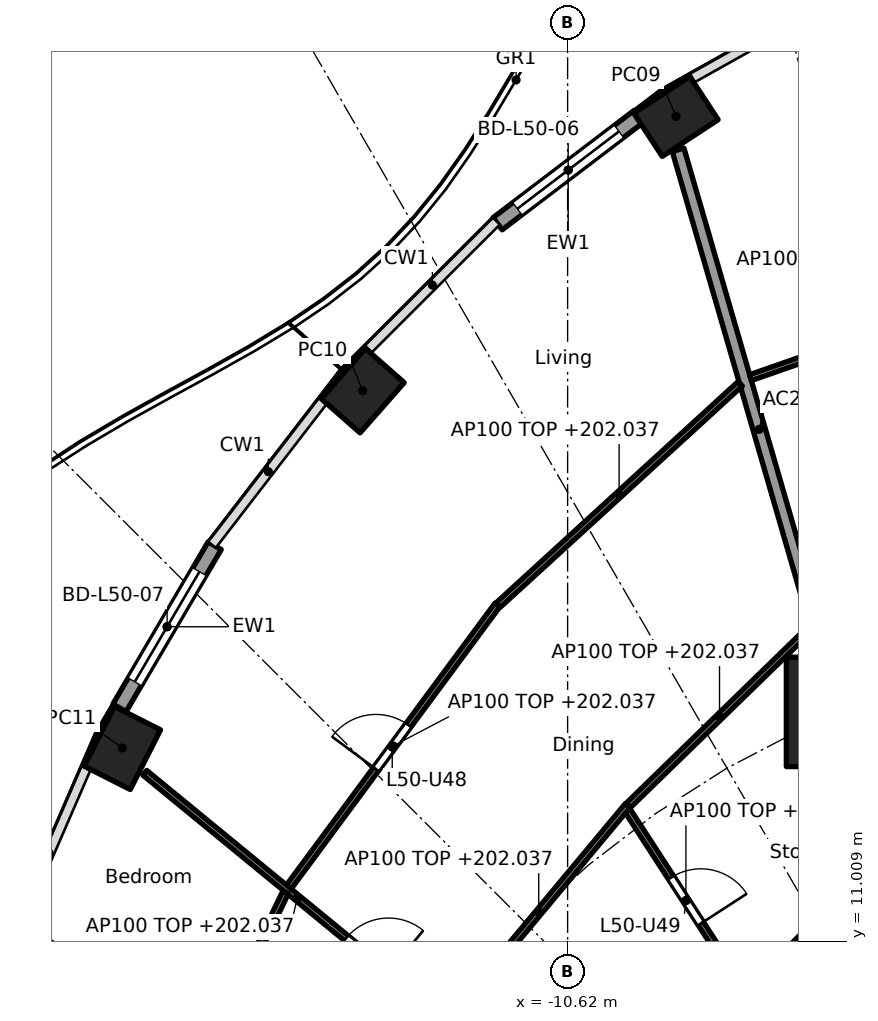
"""IFC4 building model, lengths in metres.
Left out: names, types, materials, properties, quantities, classifications, styles, units other than length and angle.
Written with IfcOpenShell. Run it as: python <this file> out.ifc"""

import sys

from ifc_helpers import new_model, si_unit, direction, frame, frame_2d, origin, origin_2d, place, context, subcontext, project, spatial, rectangle, hollow_rectangle, extrude, element, fill, save


model = new_model("IFC4")
c1 = context("Model", 3, precision=1e-05, world=origin(), true_north=direction((0.0, 1.0)))
c2 = subcontext(c1, "Body", "Model", "MODEL_VIEW")
j1 = project(units=[si_unit("LENGTHUNIT", "METRE"), si_unit("PLANEANGLEUNIT", "RADIAN")], contexts=[c1])
p1 = place(None, origin())
s1 = spatial("IfcSite", under=j1, at=p1, CompositionType="ELEMENT")
p2 = place(p1, origin())
s2 = spatial("IfcBuilding", under=s1, at=p2, CompositionType="ELEMENT")
p3 = place(p2, frame((0.0, 0.0, 199.2)))
s3 = spatial("IfcBuildingStorey", under=s2, at=p3, CompositionType="ELEMENT", Elevation=199.2)
for number, where, z_axis, x_axis in (
    (1, (-8.837, 24.573, 0.0), (0.0, 0.0, 1.0), (-0.836, -0.549, 0.0)),
    (2, (-13.989, 20.064, 0.0), (0.0, 0.0, 1.0), (-0.66, -0.751, 0.0)),
    (3, (-17.942, 14.188, 0.0), (0.0, 0.0, 1.0), (-0.452, -0.892, 0.0)),
):
    element("IfcColumn", number, at=place(p3, frame(where, z_axis=z_axis, x_axis=x_axis)), inside=s3, PredefinedType="COLUMN", context=c2, shape_type="SweptSolid", body=[
        extrude(hollow_rectangle(XDim=1.1, YDim=0.85, WallThickness=0.036, at=origin_2d()), origin(), (0.0, 0.0, 1.0), 3.7),
    ])
p4 = place(p3, frame((-6.123, 14.782, 0.0), z_axis=(0.0, 0.0, 1.0), x_axis=(1.0, 0.0, 0.0)))
e4 = element("IfcColumn", 4, at=p4, inside=s3, PredefinedType="COLUMN", context=c2, shape_type="SweptSolid", body=[
    extrude(rectangle(XDim=1.8, YDim=1.8, at=origin_2d()), origin(), (0.0, 0.0, 1.0), 3.7),
])
p5 = place(p3, frame((-11.772, 22.809, 0.0), z_axis=(0.0, 0.0, 1.0), x_axis=(0.796055733703, 0.60522332146, 0.0)))
e5 = element("IfcWall", 5, at=p5, inside=s3, PredefinedType="SOLIDWALL", context=c2, shape_type="SweptSolid", body=[
    extrude(rectangle(XDim=2.917, YDim=0.25, at=frame_2d((1.458, 0.0))), origin(), (0.0, 0.0, 1.0), 3.44),
])
p6 = place(p5, frame((0.408, 0.0, 0.0)))
e6 = element("IfcOpeningElement", 6, at=p6, cuts=e5, PredefinedType="OPENING", context=c2, shape_type="SweptSolid", body=[
    extrude(rectangle(XDim=2.1, YDim=2.4, at=frame_2d((1.05, 1.2))), frame((0.0, 0.135, 0.0), z_axis=(0.0, -1.0, 0.0), x_axis=(1.0, 0.0, 0.0)), (0.0, 0.0, 1.0), 0.27),
])
p7 = place(p3, frame((-17.989, 14.848, 0.0), z_axis=(0.0, 0.0, 1.0), x_axis=(0.506309086483, 0.862352079458, 0.0)))
e7 = element("IfcWall", 7, at=p7, inside=s3, PredefinedType="SOLIDWALL", context=c2, shape_type="SweptSolid", body=[
    extrude(rectangle(XDim=3.092, YDim=0.25, at=frame_2d((1.546, 0.0))), origin(), (0.0, 0.0, 1.0), 3.44),
])
p8 = place(p7, frame((0.496, 0.0, 0.0)))
e8 = element("IfcOpeningElement", 8, at=p8, cuts=e7, PredefinedType="OPENING", context=c2, shape_type="SweptSolid", body=[
    extrude(rectangle(XDim=2.1, YDim=2.4, at=frame_2d((1.05, 1.2))), frame((0.0, 0.135, 0.0), z_axis=(0.0, -1.0, 0.0), x_axis=(1.0, 0.0, 0.0)), (0.0, 0.0, 1.0), 0.27),
])
p9 = place(p3, frame((-6.137, 14.83, 0.0), z_axis=(0.0, 0.0, 1.0), x_axis=(-0.278461169897, 0.96044748782, 0.0)))
e9 = element("IfcWall", 9, at=p9, inside=s3, PredefinedType="PARTITIONING", context=c2, shape_type="SweptSolid", body=[
    extrude(rectangle(XDim=9.573, YDim=0.2, at=frame_2d((4.787, 0.0))), origin(), (0.0, 0.0, 1.0), 2.837),
])
p10 = place(p3, frame((-5.275, 12.494, 0.0), z_axis=(0.0, 0.0, 1.0), x_axis=(-0.707106781187, -0.707106781187, 0.0)))
e10 = element("IfcWall", 10, at=p10, inside=s3, PredefinedType="PARTITIONING", context=c2, shape_type="SweptSolid", body=[
    extrude(rectangle(XDim=10.209, YDim=0.2, at=frame_2d((5.104, 0.0))), origin(), (0.0, 0.0, 1.0), 3.44),
])
p11 = place(p3, frame((-2.546, 22.051, 0.0), z_axis=(0.0, 0.0, 1.0), x_axis=(-0.94391294884, -0.330194404878, 0.0)))
e11 = element("IfcWall", 11, at=p11, inside=s3, PredefinedType="PARTITIONING", context=c2, shape_type="SweptSolid", body=[
    extrude(rectangle(XDim=5.367, YDim=0.1, at=frame_2d((2.684, 0.0))), origin(), (0.0, 0.0, 1.0), 2.837),
])
p12 = place(p3, frame((-6.616, 16.166, 0.0), z_axis=(0.0, 0.0, 1.0), x_axis=(-0.716919058692, -0.697156412352, 0.0)))
e12 = element("IfcWall", 12, at=p12, inside=s3, PredefinedType="PARTITIONING", context=c2, shape_type="SweptSolid", body=[
    extrude(rectangle(XDim=4.2, YDim=0.1, at=frame_2d((2.1, 0.0))), origin(), (0.0, 0.0, 1.0), 2.837),
])
p13 = place(p3, frame((-7.781, 20.178, 0.0), z_axis=(0.0, 0.0, 1.0), x_axis=(-0.73807320557, -0.674720640872, 0.0)))
e13 = element("IfcWall", 13, at=p13, inside=s3, PredefinedType="PARTITIONING", context=c2, shape_type="SweptSolid", body=[
    extrude(rectangle(XDim=5.399, YDim=0.1, at=frame_2d((2.699, 0.0))), origin(), (0.0, 0.0, 1.0), 2.837),
])
p14 = place(p3, frame((-7.712, 10.195, 0.0), z_axis=(0.0, 0.0, 1.0), x_axis=(-0.544170086001, 0.838974920663, 0.0)))
e14 = element("IfcWall", 14, at=p14, inside=s3, PredefinedType="PARTITIONING", context=c2, shape_type="SweptSolid", body=[
    extrude(rectangle(XDim=3.535, YDim=0.1, at=frame_2d((1.768, 0.0))), origin(), (0.0, 0.0, 1.0), 2.756),
])
p15 = place(p14, frame((1.318, 0.0, 0.0)))
e15 = element("IfcOpeningElement", 15, at=p15, cuts=e14, PredefinedType="OPENING", context=c2, shape_type="SweptSolid", body=[
    extrude(rectangle(XDim=0.9, YDim=2.1, at=frame_2d((0.45, 1.05))), frame((0.0, 0.06, 0.0), z_axis=(0.0, -1.0, 0.0), x_axis=(1.0, 0.0, 0.0)), (0.0, 0.0, 1.0), 0.12),
])
p16 = place(p3, frame((-9.631, 13.242, 0.0), z_axis=(0.0, 0.0, 1.0), x_axis=(-0.640315711982, -0.768111833647, 0.0)))
e16 = element("IfcWall", 16, at=p16, inside=s3, PredefinedType="PARTITIONING", context=c2, shape_type="SweptSolid", body=[
    extrude(rectangle(XDim=4.572, YDim=0.1, at=frame_2d((2.286, 0.0))), origin(), (0.0, 0.0, 1.0), 2.837),
])
p17 = place(p3, frame((-11.773, 16.542, 0.0), z_axis=(0.0, 0.0, 1.0), x_axis=(-0.594694305999, -0.803951915485, 0.0)))
e17 = element("IfcWall", 17, at=p17, inside=s3, PredefinedType="PARTITIONING", context=c2, shape_type="SweptSolid", body=[
    extrude(rectangle(XDim=5.772, YDim=0.1, at=frame_2d((2.886, 0.0))), origin(), (0.0, 0.0, 1.0), 2.837),
])
p18 = place(p17, frame((2.461, 0.0, 0.0)))
e18 = element("IfcOpeningElement", 18, at=p18, cuts=e17, PredefinedType="OPENING", context=c2, shape_type="SweptSolid", body=[
    extrude(rectangle(XDim=0.9, YDim=2.1, at=frame_2d((0.45, 1.05))), frame((0.0, 0.06, 0.0), z_axis=(0.0, -1.0, 0.0), x_axis=(1.0, 0.0, 0.0)), (0.0, 0.0, 1.0), 0.12),
])
p19 = place(p3, frame((-12.552, 9.66, 0.0), z_axis=(0.0, 0.0, 1.0), x_axis=(-0.773134336716, 0.634242301799, 0.0)))
e19 = element("IfcWall", 19, at=p19, inside=s3, PredefinedType="PARTITIONING", context=c2, shape_type="SweptSolid", body=[
    extrude(rectangle(XDim=6.495, YDim=0.1, at=frame_2d((3.248, 0.0))), origin(), (0.0, 0.0, 1.0), 2.837),
])
p20 = place(p19, frame((1.31, 0.0, 0.0)))
e20 = element("IfcOpeningElement", 20, at=p20, cuts=e19, PredefinedType="OPENING", context=c2, shape_type="SweptSolid", body=[
    extrude(rectangle(XDim=0.9, YDim=2.1, at=frame_2d((0.45, 1.05))), frame((0.0, 0.06, 0.0), z_axis=(0.0, -1.0, 0.0), x_axis=(1.0, 0.0, 0.0)), (0.0, 0.0, 1.0), 0.12),
])
p21 = place(p3, frame((-15.257, 11.816, 0.0), z_axis=(0.0, 0.0, 1.0), x_axis=(-0.434040130629, -0.900893536997, 0.0)))
e21 = element("IfcWall", 21, at=p21, inside=s3, PredefinedType="PARTITIONING", context=c2, shape_type="SweptSolid", body=[
    extrude(rectangle(XDim=5.558, YDim=0.1, at=frame_2d((2.779, 0.0))), origin(), (0.0, 0.0, 1.0), 3.44),
])
p22 = place(p6, origin())
e22 = element("IfcDoor", 22, at=p22, inside=s3, OperationType="SLIDING_TO_LEFT", PredefinedType="DOOR", context=c2, shape_type="SweptSolid", body=[
    extrude(rectangle(XDim=2.1, YDim=2.4, at=frame_2d((1.05, 1.2))), frame((0.0, 0.025, 0.0), z_axis=(0.0, -1.0, 0.0), x_axis=(1.0, 0.0, 0.0)), (0.0, 0.0, 1.0), 0.05),
])
fill(e6, e22)
p23 = place(p8, origin())
e23 = element("IfcDoor", 23, at=p23, inside=s3, OperationType="SLIDING_TO_LEFT", PredefinedType="DOOR", context=c2, shape_type="SweptSolid", body=[
    extrude(rectangle(XDim=2.1, YDim=2.4, at=frame_2d((1.05, 1.2))), frame((0.0, 0.025, 0.0), z_axis=(0.0, -1.0, 0.0), x_axis=(1.0, 0.0, 0.0)), (0.0, 0.0, 1.0), 0.05),
])
fill(e8, e23)
p24 = place(p20, frame((0.9, 0.0, 0.0), x_axis=(-1.0, 0.0, 0.0)))
e24 = element("IfcDoor", 24, at=p24, inside=s3, OperationType="SINGLE_SWING_RIGHT", PredefinedType="DOOR", context=c2, shape_type="SweptSolid", body=[
    extrude(rectangle(XDim=0.9, YDim=2.1, at=frame_2d((0.45, 1.05))), frame((0.0, 0.025, 0.0), z_axis=(0.0, -1.0, 0.0), x_axis=(1.0, 0.0, 0.0)), (0.0, 0.0, 1.0), 0.05),
])
fill(e20, e24)
p25 = place(p18, frame((0.9, 0.0, 0.0), x_axis=(-1.0, 0.0, 0.0)))
e25 = element("IfcDoor", 25, at=p25, inside=s3, OperationType="SINGLE_SWING_LEFT", PredefinedType="DOOR", context=c2, shape_type="SweptSolid", body=[
    extrude(rectangle(XDim=0.9, YDim=2.1, at=frame_2d((0.45, 1.05))), frame((0.0, 0.025, 0.0), z_axis=(0.0, -1.0, 0.0), x_axis=(1.0, 0.0, 0.0)), (0.0, 0.0, 1.0), 0.05),
])
fill(e18, e25)
p26 = place(p15, frame((0.9, 0.0, 0.0), x_axis=(-1.0, 0.0, 0.0)))
e26 = element("IfcDoor", 26, at=p26, inside=s3, OperationType="SINGLE_SWING_RIGHT", PredefinedType="DOOR", context=c2, shape_type="SweptSolid", body=[
    extrude(rectangle(XDim=0.9, YDim=2.1, at=frame_2d((0.45, 1.05))), frame((0.0, 0.025, 0.0), z_axis=(0.0, -1.0, 0.0), x_axis=(1.0, 0.0, 0.0)), (0.0, 0.0, 1.0), 0.05),
])
fill(e15, e26)
save(model, sys.argv[1])
